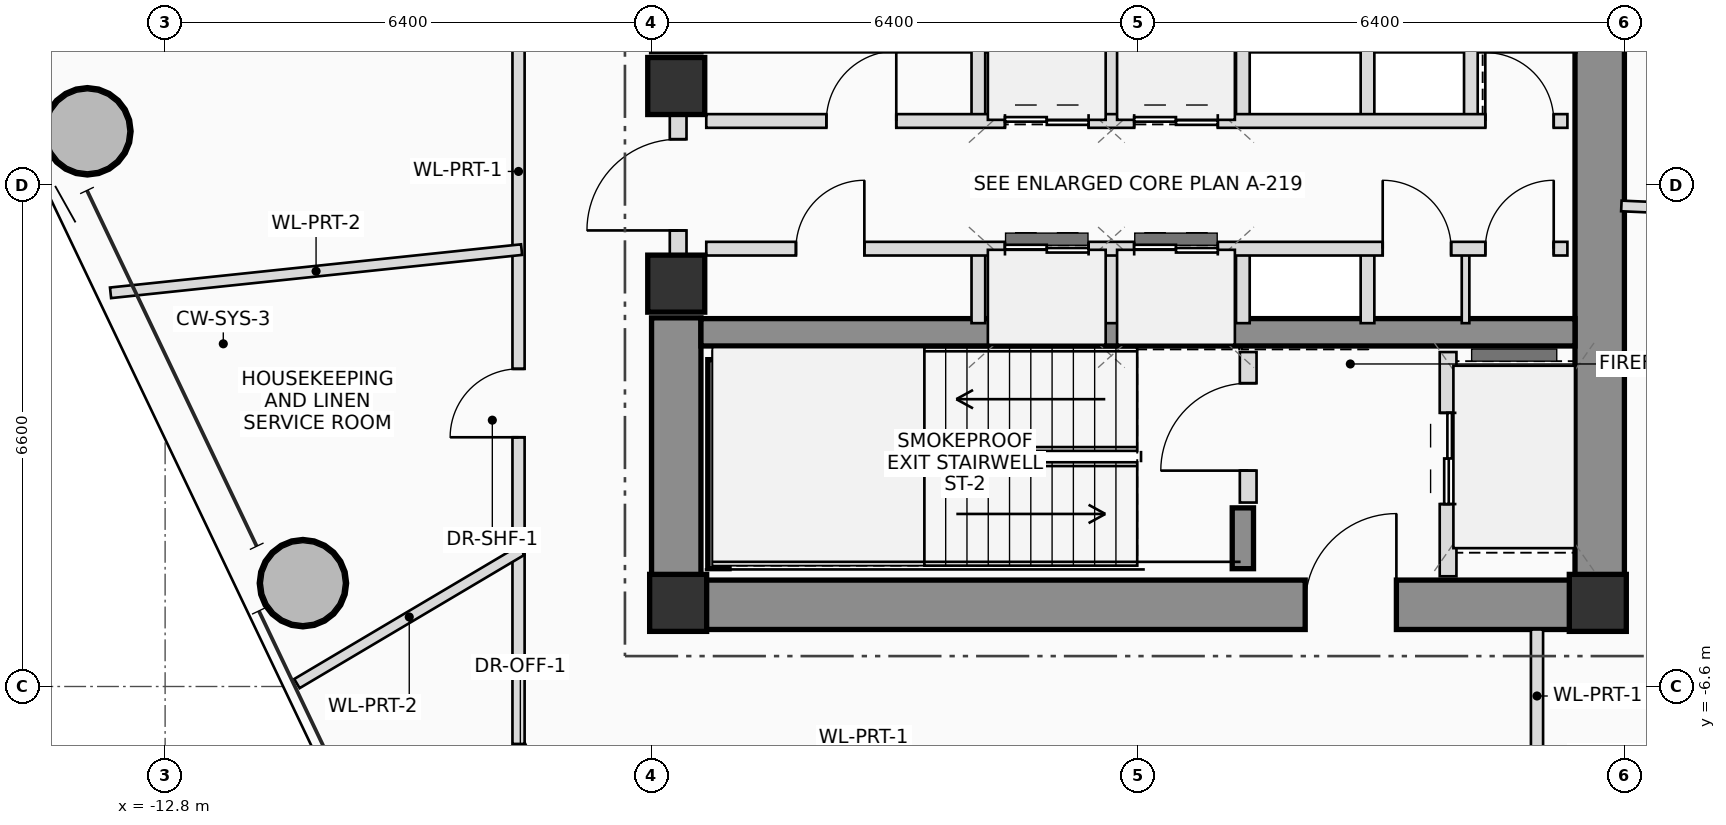
"""IFC4 building model, lengths in metres.
Left out: names, types, materials, properties, quantities, classifications, styles, units other than length and angle.
Written with IfcOpenShell. Run it as: python <this file> out.ifc"""

import sys

from ifc_helpers import new_model, si_unit, direction, frame, frame_2d, origin, origin_2d, place, context, subcontext, project, spatial, rectangle, hollow_circle, extrude, source, transform, mapped, element, fill, save


model = new_model("IFC4")
c1 = context("Model", 3, precision=1e-05, world=origin(), true_north=direction((0.0, 1.0)))
c2 = subcontext(c1, "Body", "Model", "MODEL_VIEW")
j1 = project(units=[si_unit("LENGTHUNIT", "METRE"), si_unit("PLANEANGLEUNIT", "RADIAN")], contexts=[c1])
p1 = place(None, origin())
s1 = spatial("IfcSite", under=j1, at=p1, CompositionType="ELEMENT")
p2 = place(p1, origin())
s2 = spatial("IfcBuilding", under=s1, at=p2, CompositionType="ELEMENT")
p3 = place(p2, frame((0.0, 0.0, 212.15)))
s3 = spatial("IfcBuildingStorey", under=s2, at=p3, CompositionType="ELEMENT", Elevation=212.15)
m1 = source(origin(), c2, "Body", "SweptSolid", [
    extrude(rectangle(XDim=0.75, YDim=0.75, at=origin_2d()), origin(), (0.0, 0.0, 1.0), 3.45),
])
for number, where, z_axis, x_axis in (
    (1, (-6.05, -5.5, 0.0), (0.0, 0.0, 1.0), (1.0, 0.0, 0.0)),
    (2, (6.05, -5.5, 0.0), (0.0, 0.0, 1.0), (1.0, 0.0, 0.0)),
):
    element("IfcColumn", number, at=place(p3, frame(where, z_axis=z_axis, x_axis=x_axis)), inside=s3, PredefinedType="COLUMN", context=c2, shape_type="MappedRepresentation", body=[
        mapped(m1, transform((0.0, 0.0, 0.0), scale=1.0)),
    ])
p4 = place(p3, frame((-6.4, -5.525, 0.0), z_axis=(0.0, 0.0, 1.0), x_axis=(1.0, 0.0, 0.0)))
e3 = element("IfcWall", 3, at=p4, inside=s3, PredefinedType="SHEAR", context=c2, shape_type="SweptSolid", body=[
    extrude(rectangle(XDim=12.8, YDim=0.65, at=frame_2d((6.4, 0.0))), origin(), (0.0, 0.0, 1.0), 3.45),
])
p5 = place(p4, frame((8.6, 0.0, 0.0)))
e4 = element("IfcOpeningElement", 4, at=p5, cuts=e3, PredefinedType="OPENING", context=c2, shape_type="SweptSolid", body=[
    extrude(rectangle(XDim=1.2, YDim=2.2, at=frame_2d((0.6, 1.1))), frame((0.0, 0.335, 0.0), z_axis=(0.0, -1.0, 0.0), x_axis=(1.0, 0.0, 0.0)), (0.0, 0.0, 1.0), 0.67),
])
p6 = place(p3, frame((6.075, -5.2, 0.0), z_axis=(0.0, 0.0, 1.0), x_axis=(0.0, 1.0, 0.0)))
e5 = element("IfcWall", 5, at=p6, inside=s3, PredefinedType="SHEAR", context=c2, shape_type="SweptSolid", body=[
    extrude(rectangle(XDim=10.4, YDim=0.65, at=frame_2d((5.2, 0.0))), origin(), (0.0, 0.0, 1.0), 3.45),
])
p7 = place(p3, frame((-6.075, -5.2, 0.0), z_axis=(0.0, 0.0, 1.0), x_axis=(0.0, 1.0, 0.0)))
e6 = element("IfcWall", 6, at=p7, inside=s3, PredefinedType="SHEAR", context=c2, shape_type="SweptSolid", body=[
    extrude(rectangle(XDim=3.45, YDim=0.65, at=frame_2d((1.725, 0.0))), origin(), (0.0, 0.0, 1.0), 3.45),
])
p8 = place(p3, frame((-5.75, -1.94, 0.0), z_axis=(0.0, 0.0, 1.0), x_axis=(1.0, 0.0, 0.0)))
e7 = element("IfcWall", 7, at=p8, inside=s3, PredefinedType="SHEAR", context=c2, shape_type="SweptSolid", body=[
    extrude(rectangle(XDim=11.5, YDim=0.36, at=frame_2d((5.75, 0.0))), origin(), (0.0, 0.0, 1.0), 3.45),
])
p9 = place(p3, frame((-5.52, -5.05, 0.0), z_axis=(0.0, 0.0, 1.0), x_axis=(0.0, 1.0, 0.0)))
e8 = element("IfcWall", 8, at=p9, inside=s3, PredefinedType="SHEAR", context=c2, shape_type="SweptSolid", body=[
    extrude(rectangle(XDim=2.75, YDim=0.28, at=frame_2d((1.375, 0.0))), origin(), (0.0, 0.0, 1.0), 3.45),
])
p10 = place(p3, frame((1.38, -5.05, 0.0), z_axis=(0.0, 0.0, 1.0), x_axis=(0.0, 1.0, 0.0)))
e9 = element("IfcWall", 9, at=p10, inside=s3, PredefinedType="SHEAR", context=c2, shape_type="SweptSolid", body=[
    extrude(rectangle(XDim=0.8, YDim=0.28, at=frame_2d((0.4, 0.0))), origin(), (0.0, 0.0, 1.0), 3.45),
])
for number, where, z_axis, x_axis in (
    (10, (-6.075, -1.3, 0.0), (0.0, 0.0, 1.0), (1.0, 0.0, 0.0)),
    (11, (-6.075, 1.3, 0.0), (0.0, 0.0, 1.0), (1.0, 0.0, 0.0)),
):
    element("IfcColumn", number, at=place(p3, frame(where, z_axis=z_axis, x_axis=x_axis)), inside=s3, PredefinedType="COLUMN", context=c2, shape_type="MappedRepresentation", body=[
        mapped(m1, transform((0.0, 0.0, 0.0), scale=1.0)),
    ])
m2 = source(origin(), c2, "Body", "SweptSolid", [
    extrude(hollow_circle(Radius=0.575, WallThickness=0.042, at=origin_2d()), origin(), (0.0, 0.0, 1.0), 3.45),
])
for number, where, z_axis, x_axis in (
    (12, (-13.823, 0.704, 0.0), (0.0, 0.0, 1.0), (1.0, 0.0, 0.0)),
    (13, (-10.987, -5.24, 0.0), (0.0, 0.0, 1.0), (1.0, 0.0, 0.0)),
):
    element("IfcColumn", number, at=place(p3, frame(where, z_axis=z_axis, x_axis=x_axis)), inside=s3, PredefinedType="COLUMN", context=c2, shape_type="MappedRepresentation", body=[
        mapped(m2, transform((0.0, 0.0, 0.0), scale=1.0)),
    ])
p11 = place(p3, frame((-6.05, -0.95, 0.0), z_axis=(0.0, 0.0, 1.0), x_axis=(0.0, 1.0, 0.0)))
e14 = element("IfcWall", 14, at=p11, inside=s3, PredefinedType="PLUMBINGWALL", context=c2, shape_type="SweptSolid", body=[
    extrude(rectangle(XDim=1.9, YDim=0.22, at=frame_2d((0.95, 0.0))), origin(), (0.0, 0.0, 1.0), 2.23),
])
p12 = place(p11, frame((0.35, 0.0, 0.0)))
e15 = element("IfcOpeningElement", 15, at=p12, cuts=e14, PredefinedType="OPENING", context=c2, shape_type="SweptSolid", body=[
    extrude(rectangle(XDim=1.2, YDim=2.2, at=frame_2d((0.6, 1.1))), frame((0.0, 0.12, 0.0), z_axis=(0.0, -1.0, 0.0), x_axis=(1.0, 0.0, 0.0)), (0.0, 0.0, 1.0), 0.24),
])
p13 = place(p3, frame((1.45, -4.18, 0.0), z_axis=(0.0, 0.0, 1.0), x_axis=(0.0, 1.0, 0.0)))
e16 = element("IfcWall", 16, at=p13, inside=s3, PredefinedType="PLUMBINGWALL", context=c2, shape_type="SweptSolid", body=[
    extrude(rectangle(XDim=1.98, YDim=0.22, at=frame_2d((0.99, 0.0))), origin(), (0.0, 0.0, 1.0), 3.25),
])
p14 = place(p13, frame((0.42, 0.0, 0.0)))
e17 = element("IfcOpeningElement", 17, at=p14, cuts=e16, PredefinedType="OPENING", context=c2, shape_type="SweptSolid", body=[
    extrude(rectangle(XDim=1.15, YDim=2.15, at=frame_2d((0.575, 1.075))), frame((0.0, 0.12, 0.0), z_axis=(0.0, -1.0, 0.0), x_axis=(1.0, 0.0, 0.0)), (0.0, 0.0, 1.0), 0.24),
])
p15 = place(p3, frame((4.08, -5.15, 0.0), z_axis=(0.0, 0.0, 1.0), x_axis=(0.0, 1.0, 0.0)))
e18 = element("IfcWall", 18, at=p15, inside=s3, PredefinedType="PLUMBINGWALL", context=c2, shape_type="SweptSolid", body=[
    extrude(rectangle(XDim=2.95, YDim=0.22, at=frame_2d((1.475, 0.0))), origin(), (0.0, 0.0, 1.0), 3.25),
])
p16 = place(p15, frame((0.95, 0.0, 0.0)))
e19 = element("IfcOpeningElement", 19, at=p16, cuts=e18, PredefinedType="OPENING", context=c2, shape_type="SweptSolid", body=[
    extrude(rectangle(XDim=1.2, YDim=2.25, at=frame_2d((0.6, 1.125))), frame((0.0, 0.12, 0.0), z_axis=(0.0, -1.0, 0.0), x_axis=(1.0, 0.0, 0.0)), (0.0, 0.0, 1.0), 0.24),
])
for number, where, z_axis, x_axis in (
    (20, (-2.1, 0.84, 0.0), (0.0, 0.0, 1.0), (0.0, 1.0, 0.0)),
    (21, (-2.1, -1.82, 0.0), (0.0, 0.0, 1.0), (0.0, 1.0, 0.0)),
    (22, (-0.35, 0.84, 0.0), (0.0, 0.0, 1.0), (0.0, 1.0, 0.0)),
    (23, (-0.35, -1.82, 0.0), (0.0, 0.0, 1.0), (0.0, 1.0, 0.0)),
    (24, (1.38, 0.84, 0.0), (0.0, 0.0, 1.0), (0.0, 1.0, 0.0)),
    (25, (1.38, -1.82, 0.0), (0.0, 0.0, 1.0), (0.0, 1.0, 0.0)),
    (26, (3.02, 0.84, 0.0), (0.0, 0.0, 1.0), (0.0, 1.0, 0.0)),
    (27, (4.38, 0.84, 0.0), (0.0, 0.0, 1.0), (0.0, 1.0, 0.0)),
    (28, (3.02, -1.82, 0.0), (0.0, 0.0, 1.0), (0.0, 1.0, 0.0)),
):
    element("IfcWall", number, at=place(p3, frame(where, z_axis=z_axis, x_axis=x_axis)), inside=s3, PredefinedType="PLUMBINGWALL", context=c2, shape_type="SweptSolid", body=[
        extrude(rectangle(XDim=0.98, YDim=0.18, at=frame_2d((0.49, 0.0))), origin(), (0.0, 0.0, 1.0), 3.25),
    ])
p17 = place(p3, frame((4.31, -1.82, 0.0), z_axis=(0.0, 0.0, 1.0), x_axis=(0.0, 1.0, 0.0)))
e29 = element("IfcWall", 29, at=p17, inside=s3, PredefinedType="PARTITIONING", context=c2, shape_type="SweptSolid", body=[
    extrude(rectangle(XDim=0.98, YDim=0.1, at=frame_2d((0.49, 0.0))), origin(), (0.0, 0.0, 1.0), 3.25),
])
p18 = place(p3, frame((-5.68, 0.84, 0.0), z_axis=(0.0, 0.0, 1.0), x_axis=(1.0, 0.0, 0.0)))
e30 = element("IfcWall", 30, at=p18, inside=s3, PredefinedType="PLUMBINGWALL", context=c2, shape_type="SweptSolid", body=[
    extrude(rectangle(XDim=11.33, YDim=0.18, at=frame_2d((5.665, 0.0))), origin(), (0.0, 0.0, 1.0), 3.25),
])
p19 = place(p18, frame((1.58, 0.0, 0.0)))
e31 = element("IfcOpeningElement", 31, at=p19, cuts=e30, PredefinedType="OPENING", context=c2, shape_type="SweptSolid", body=[
    extrude(rectangle(XDim=0.92, YDim=2.1, at=frame_2d((0.46, 1.05))), frame((0.0, 0.1, 0.0), z_axis=(0.0, -1.0, 0.0), x_axis=(1.0, 0.0, 0.0)), (0.0, 0.0, 1.0), 0.2),
])
p20 = place(p18, frame((3.93, 0.0, 0.0)))
e32 = element("IfcOpeningElement", 32, at=p20, cuts=e30, PredefinedType="OPENING", context=c2, shape_type="SweptSolid", body=[
    extrude(rectangle(XDim=1.1, YDim=2.2, at=frame_2d((0.55, 1.1))), frame((0.0, 0.1, 0.0), z_axis=(0.0, -1.0, 0.0), x_axis=(1.0, 0.0, 0.0)), (0.0, 0.0, 1.0), 0.2),
])
p21 = place(p18, frame((5.63, 0.0, 0.0)))
e33 = element("IfcOpeningElement", 33, at=p21, cuts=e30, PredefinedType="OPENING", context=c2, shape_type="SweptSolid", body=[
    extrude(rectangle(XDim=1.1, YDim=2.2, at=frame_2d((0.55, 1.1))), frame((0.0, 0.1, 0.0), z_axis=(0.0, -1.0, 0.0), x_axis=(1.0, 0.0, 0.0)), (0.0, 0.0, 1.0), 0.2),
])
p22 = place(p18, frame((10.25, 0.0, 0.0)))
e34 = element("IfcOpeningElement", 34, at=p22, cuts=e30, PredefinedType="OPENING", context=c2, shape_type="SweptSolid", body=[
    extrude(rectangle(XDim=0.9, YDim=2.05, at=frame_2d((0.45, 1.025))), frame((0.0, 0.1, 0.0), z_axis=(0.0, -1.0, 0.0), x_axis=(1.0, 0.0, 0.0)), (0.0, 0.0, 1.0), 0.2),
])
p23 = place(p3, frame((-5.68, -0.84, 0.0), z_axis=(0.0, 0.0, 1.0), x_axis=(1.0, 0.0, 0.0)))
e35 = element("IfcWall", 35, at=p23, inside=s3, PredefinedType="PLUMBINGWALL", context=c2, shape_type="SweptSolid", body=[
    extrude(rectangle(XDim=11.33, YDim=0.18, at=frame_2d((5.665, 0.0))), origin(), (0.0, 0.0, 1.0), 3.25),
])
p24 = place(p23, frame((1.18, 0.0, 0.0)))
e36 = element("IfcOpeningElement", 36, at=p24, cuts=e35, PredefinedType="OPENING", context=c2, shape_type="SweptSolid", body=[
    extrude(rectangle(XDim=0.9, YDim=2.05, at=frame_2d((0.45, 1.025))), frame((0.0, 0.1, 0.0), z_axis=(0.0, -1.0, 0.0), x_axis=(1.0, 0.0, 0.0)), (0.0, 0.0, 1.0), 0.2),
])
p25 = place(p23, frame((3.93, 0.0, 0.0)))
e37 = element("IfcOpeningElement", 37, at=p25, cuts=e35, PredefinedType="OPENING", context=c2, shape_type="SweptSolid", body=[
    extrude(rectangle(XDim=1.1, YDim=2.2, at=frame_2d((0.55, 1.1))), frame((0.0, 0.1, 0.0), z_axis=(0.0, -1.0, 0.0), x_axis=(1.0, 0.0, 0.0)), (0.0, 0.0, 1.0), 0.2),
])
p26 = place(p23, frame((5.63, 0.0, 0.0)))
e38 = element("IfcOpeningElement", 38, at=p26, cuts=e35, PredefinedType="OPENING", context=c2, shape_type="SweptSolid", body=[
    extrude(rectangle(XDim=1.1, YDim=2.2, at=frame_2d((0.55, 1.1))), frame((0.0, 0.1, 0.0), z_axis=(0.0, -1.0, 0.0), x_axis=(1.0, 0.0, 0.0)), (0.0, 0.0, 1.0), 0.2),
])
p27 = place(p23, frame((8.9, 0.0, 0.0)))
e39 = element("IfcOpeningElement", 39, at=p27, cuts=e35, PredefinedType="OPENING", context=c2, shape_type="SweptSolid", body=[
    extrude(rectangle(XDim=0.9, YDim=2.05, at=frame_2d((0.45, 1.025))), frame((0.0, 0.1, 0.0), z_axis=(0.0, -1.0, 0.0), x_axis=(1.0, 0.0, 0.0)), (0.0, 0.0, 1.0), 0.2),
])
p28 = place(p23, frame((10.25, 0.0, 0.0)))
e40 = element("IfcOpeningElement", 40, at=p28, cuts=e35, PredefinedType="OPENING", context=c2, shape_type="SweptSolid", body=[
    extrude(rectangle(XDim=0.9, YDim=2.05, at=frame_2d((0.45, 1.025))), frame((0.0, 0.1, 0.0), z_axis=(0.0, -1.0, 0.0), x_axis=(1.0, 0.0, 0.0)), (0.0, 0.0, 1.0), 0.2),
])
p29 = place(p3, frame((-6.36, -11.108, 0.0), z_axis=(0.0, 0.0, 1.0), x_axis=(-0.430460013629, 0.902609648002, 0.0)))
e41 = element("IfcWall", 41, at=p29, inside=s3, PredefinedType="PARTITIONING", context=c2, shape_type="SweptSolid", body=[
    extrude(rectangle(XDim=4.158, YDim=0.16, at=frame_2d((2.079, 0.0))), origin(), (0.0, 0.0, 1.0), 2.605),
])
p30 = place(p29, frame((2.577, 0.0, 0.0)))
e42 = element("IfcOpeningElement", 42, at=p30, cuts=e41, PredefinedType="OPENING", context=c2, shape_type="SweptSolid", body=[
    extrude(rectangle(XDim=1.0, YDim=2.25, at=frame_2d((0.5, 1.125))), frame((0.0, 0.09, 0.0), z_axis=(0.0, -1.0, 0.0), x_axis=(1.0, 0.0, 0.0)), (0.0, 0.0, 1.0), 0.18),
])
p31 = place(p3, frame((-8.15, -7.355, 0.0), z_axis=(0.0, 0.0, 1.0), x_axis=(0.0, 1.0, 0.0)))
e43 = element("IfcWall", 43, at=p31, inside=s3, PredefinedType="PARTITIONING", context=c2, shape_type="SweptSolid", body=[
    extrude(rectangle(XDim=14.956, YDim=0.16, at=frame_2d((7.478, 0.0))), origin(), (0.0, 0.0, 1.0), 2.605),
])
p32 = place(p31, frame((4.034, 0.0, 0.0)))
e44 = element("IfcOpeningElement", 44, at=p32, cuts=e43, PredefinedType="OPENING", context=c2, shape_type="SweptSolid", body=[
    extrude(rectangle(XDim=0.9, YDim=2.05, at=frame_2d((0.45, 1.025))), frame((0.0, 0.09, 0.0), z_axis=(0.0, -1.0, 0.0), x_axis=(1.0, 0.0, 0.0)), (0.0, 0.0, 1.0), 0.18),
])
p33 = place(p31, frame((10.129, 0.0, 0.0)))
e45 = element("IfcOpeningElement", 45, at=p33, cuts=e43, PredefinedType="OPENING", context=c2, shape_type="SweptSolid", body=[
    extrude(rectangle(XDim=1.0, YDim=2.25, at=frame_2d((0.5, 1.125))), frame((0.0, 0.09, 0.0), z_axis=(0.0, -1.0, 0.0), x_axis=(1.0, 0.0, 0.0)), (0.0, 0.0, 1.0), 0.18),
])
p34 = place(p3, frame((5.25, -5.85, 0.0), z_axis=(0.0, 0.0, 1.0), x_axis=(0.0, -1.0, 0.0)))
e46 = element("IfcWall", 46, at=p34, inside=s3, PredefinedType="PARTITIONING", context=c2, shape_type="SweptSolid", body=[
    extrude(rectangle(XDim=1.75, YDim=0.16, at=frame_2d((0.875, 0.0))), origin(), (0.0, 0.0, 1.0), 3.25),
])
p35 = place(p3, frame((6.36, -0.278, 0.0), z_axis=(0.0, 0.0, 1.0), x_axis=(0.999047276506, -0.04364102778, 0.0)))
e47 = element("IfcWall", 47, at=p35, inside=s3, PredefinedType="PARTITIONING", context=c2, shape_type="SweptSolid", body=[
    extrude(rectangle(XDim=7.642, YDim=0.14, at=frame_2d((3.821, 0.0))), origin(), (0.0, 0.0, 1.0), 2.605),
])
p36 = place(p3, frame((-8.11, -0.852, 0.0), z_axis=(0.0, 0.0, 1.0), x_axis=(-0.994517501458, -0.104570260086, 0.0)))
e48 = element("IfcWall", 48, at=p36, inside=s3, PredefinedType="PARTITIONING", context=c2, shape_type="SweptSolid", body=[
    extrude(rectangle(XDim=5.438, YDim=0.14, at=frame_2d((2.719, 0.0))), origin(), (0.0, 0.0, 1.0), 2.765),
])
p37 = place(p3, frame((-8.11, -4.809, 0.0), z_axis=(0.0, 0.0, 1.0), x_axis=(-0.860151862046, -0.510038012524, 0.0)))
e49 = element("IfcWall", 49, at=p37, inside=s3, PredefinedType="PARTITIONING", context=c2, shape_type="SweptSolid", body=[
    extrude(rectangle(XDim=3.436, YDim=0.14, at=frame_2d((1.718, 0.0))), origin(), (0.0, 0.0, 1.0), 2.605),
])
p38 = place(p5, origin())
e50 = element("IfcDoor", 50, at=p38, inside=s3, OperationType="SINGLE_SWING_RIGHT", PredefinedType="DOOR", context=c2, shape_type="SweptSolid", body=[
    extrude(rectangle(XDim=1.2, YDim=2.2, at=frame_2d((0.6, 1.1))), frame((0.0, 0.025, 0.0), z_axis=(0.0, -1.0, 0.0), x_axis=(1.0, 0.0, 0.0)), (0.0, 0.0, 1.0), 0.05),
])
fill(e4, e50)
p39 = place(p12, origin())
e51 = element("IfcDoor", 51, at=p39, inside=s3, OperationType="SINGLE_SWING_LEFT", PredefinedType="DOOR", context=c2, shape_type="SweptSolid", body=[
    extrude(rectangle(XDim=1.2, YDim=2.2, at=frame_2d((0.6, 1.1))), frame((0.0, 0.025, 0.0), z_axis=(0.0, -1.0, 0.0), x_axis=(1.0, 0.0, 0.0)), (0.0, 0.0, 1.0), 0.05),
])
fill(e15, e51)
p40 = place(p14, origin())
e52 = element("IfcDoor", 52, at=p40, inside=s3, OperationType="SINGLE_SWING_LEFT", PredefinedType="DOOR", context=c2, shape_type="SweptSolid", body=[
    extrude(rectangle(XDim=1.15, YDim=2.15, at=frame_2d((0.575, 1.075))), frame((0.0, 0.025, 0.0), z_axis=(0.0, -1.0, 0.0), x_axis=(1.0, 0.0, 0.0)), (0.0, 0.0, 1.0), 0.05),
])
fill(e17, e52)
p41 = place(p16, origin())
e53 = element("IfcDoor", 53, at=p41, inside=s3, OperationType="DOUBLE_DOOR_SLIDING", PredefinedType="DOOR", context=c2, shape_type="SweptSolid", body=[
    extrude(rectangle(XDim=1.2, YDim=2.25, at=frame_2d((0.6, 1.125))), frame((0.0, 0.025, 0.0), z_axis=(0.0, -1.0, 0.0), x_axis=(1.0, 0.0, 0.0)), (0.0, 0.0, 1.0), 0.05),
])
fill(e19, e53)
p42 = place(p19, origin())
e54 = element("IfcDoor", 54, at=p42, inside=s3, OperationType="SINGLE_SWING_RIGHT", PredefinedType="DOOR", context=c2, shape_type="SweptSolid", body=[
    extrude(rectangle(XDim=0.92, YDim=2.1, at=frame_2d((0.46, 1.05))), frame((0.0, 0.025, 0.0), z_axis=(0.0, -1.0, 0.0), x_axis=(1.0, 0.0, 0.0)), (0.0, 0.0, 1.0), 0.05),
])
fill(e31, e54)
p43 = place(p20, origin())
e55 = element("IfcDoor", 55, at=p43, inside=s3, OperationType="DOUBLE_DOOR_SLIDING", PredefinedType="DOOR", context=c2, shape_type="SweptSolid", body=[
    extrude(rectangle(XDim=1.1, YDim=2.2, at=frame_2d((0.55, 1.1))), frame((0.0, 0.025, 0.0), z_axis=(0.0, -1.0, 0.0), x_axis=(1.0, 0.0, 0.0)), (0.0, 0.0, 1.0), 0.05),
])
fill(e32, e55)
p44 = place(p21, origin())
e56 = element("IfcDoor", 56, at=p44, inside=s3, OperationType="DOUBLE_DOOR_SLIDING", PredefinedType="DOOR", context=c2, shape_type="SweptSolid", body=[
    extrude(rectangle(XDim=1.1, YDim=2.2, at=frame_2d((0.55, 1.1))), frame((0.0, 0.025, 0.0), z_axis=(0.0, -1.0, 0.0), x_axis=(1.0, 0.0, 0.0)), (0.0, 0.0, 1.0), 0.05),
])
fill(e33, e56)
p45 = place(p22, origin())
e57 = element("IfcDoor", 57, at=p45, inside=s3, OperationType="SINGLE_SWING_LEFT", PredefinedType="DOOR", context=c2, shape_type="SweptSolid", body=[
    extrude(rectangle(XDim=0.9, YDim=2.05, at=frame_2d((0.45, 1.025))), frame((0.0, 0.025, 0.0), z_axis=(0.0, -1.0, 0.0), x_axis=(1.0, 0.0, 0.0)), (0.0, 0.0, 1.0), 0.05),
])
fill(e34, e57)
p46 = place(p24, origin())
e58 = element("IfcDoor", 58, at=p46, inside=s3, OperationType="SINGLE_SWING_RIGHT", PredefinedType="DOOR", context=c2, shape_type="SweptSolid", body=[
    extrude(rectangle(XDim=0.9, YDim=2.05, at=frame_2d((0.45, 1.025))), frame((0.0, 0.025, 0.0), z_axis=(0.0, -1.0, 0.0), x_axis=(1.0, 0.0, 0.0)), (0.0, 0.0, 1.0), 0.05),
])
fill(e36, e58)
p47 = place(p25, origin())
e59 = element("IfcDoor", 59, at=p47, inside=s3, OperationType="DOUBLE_DOOR_SLIDING", PredefinedType="DOOR", context=c2, shape_type="SweptSolid", body=[
    extrude(rectangle(XDim=1.1, YDim=2.2, at=frame_2d((0.55, 1.1))), frame((0.0, 0.025, 0.0), z_axis=(0.0, -1.0, 0.0), x_axis=(1.0, 0.0, 0.0)), (0.0, 0.0, 1.0), 0.05),
])
fill(e37, e59)
p48 = place(p26, origin())
e60 = element("IfcDoor", 60, at=p48, inside=s3, OperationType="DOUBLE_DOOR_SLIDING", PredefinedType="DOOR", context=c2, shape_type="SweptSolid", body=[
    extrude(rectangle(XDim=1.1, YDim=2.2, at=frame_2d((0.55, 1.1))), frame((0.0, 0.025, 0.0), z_axis=(0.0, -1.0, 0.0), x_axis=(1.0, 0.0, 0.0)), (0.0, 0.0, 1.0), 0.05),
])
fill(e38, e60)
p49 = place(p27, origin())
e61 = element("IfcDoor", 61, at=p49, inside=s3, OperationType="SINGLE_SWING_LEFT", PredefinedType="DOOR", context=c2, shape_type="SweptSolid", body=[
    extrude(rectangle(XDim=0.9, YDim=2.05, at=frame_2d((0.45, 1.025))), frame((0.0, 0.025, 0.0), z_axis=(0.0, -1.0, 0.0), x_axis=(1.0, 0.0, 0.0)), (0.0, 0.0, 1.0), 0.05),
])
fill(e39, e61)
p50 = place(p28, origin())
e62 = element("IfcDoor", 62, at=p50, inside=s3, OperationType="SINGLE_SWING_RIGHT", PredefinedType="DOOR", context=c2, shape_type="SweptSolid", body=[
    extrude(rectangle(XDim=0.9, YDim=2.05, at=frame_2d((0.45, 1.025))), frame((0.0, 0.025, 0.0), z_axis=(0.0, -1.0, 0.0), x_axis=(1.0, 0.0, 0.0)), (0.0, 0.0, 1.0), 0.05),
])
fill(e40, e62)
p51 = place(p32, origin())
e63 = element("IfcDoor", 63, at=p51, inside=s3, OperationType="SINGLE_SWING_LEFT", PredefinedType="DOOR", context=c2, shape_type="SweptSolid", body=[
    extrude(rectangle(XDim=0.9, YDim=2.05, at=frame_2d((0.45, 1.025))), frame((0.0, 0.025, 0.0), z_axis=(0.0, -1.0, 0.0), x_axis=(1.0, 0.0, 0.0)), (0.0, 0.0, 1.0), 0.05),
])
fill(e44, e63)
save(model, sys.argv[1])
